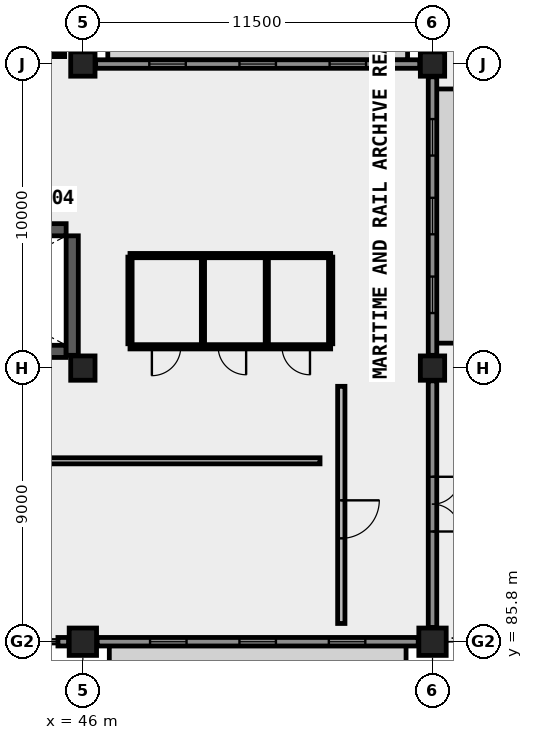
"""IFC4 building model, lengths in metres.
Left out: names, types, materials, properties, quantities, classifications, styles, units other than length and angle.
Written with IfcOpenShell. Run it as: python <this file> out.ifc"""

import sys

from ifc_helpers import new_model, si_unit, direction, frame, frame_2d, origin, origin_2d, place, context, subcontext, project, spatial, rectangle, extrude, element, fill, save


model = new_model("IFC4")
c1 = context("Model", 3, precision=1e-05, world=origin(), true_north=direction((0.0, 1.0)))
c2 = subcontext(c1, "Body", "Model", "MODEL_VIEW")
j1 = project(units=[si_unit("LENGTHUNIT", "METRE"), si_unit("PLANEANGLEUNIT", "RADIAN")], contexts=[c1])
p1 = place(None, origin())
s1 = spatial("IfcSite", under=j1, at=p1, CompositionType="ELEMENT")
p2 = place(p1, origin())
s2 = spatial("IfcBuilding", under=s1, at=p2, CompositionType="ELEMENT")
p3 = place(p2, frame((0.0, 0.0, 18.3)))
s3 = spatial("IfcBuildingStorey", under=s2, at=p3, CompositionType="ELEMENT", Elevation=18.3)
p4 = place(p3, frame((46.0, 85.8, 0.0), z_axis=(0.0, 0.0, 1.0), x_axis=(1.0, 0.0, 0.0)))
e1 = element("IfcColumn", 1, at=p4, inside=s3, PredefinedType="COLUMN", context=c2, shape_type="SweptSolid", body=[
    extrude(rectangle(XDim=0.9, YDim=0.9, at=origin_2d()), origin(), (0.0, 0.0, 1.0), 4.16),
])
for number, where, z_axis, x_axis in (
    (2, (46.0, 94.8, 0.0), (0.0, 0.0, 1.0), (1.0, 0.0, 0.0)),
    (3, (46.0, 104.8, 0.0), (0.0, 0.0, 1.0), (1.0, 0.0, 0.0)),
):
    element("IfcColumn", number, at=place(p3, frame(where, z_axis=z_axis, x_axis=x_axis)), inside=s3, PredefinedType="COLUMN", context=c2, shape_type="SweptSolid", body=[
        extrude(rectangle(XDim=0.8, YDim=0.8, at=origin_2d()), origin(), (0.0, 0.0, 1.0), 4.16),
    ])
p5 = place(p3, frame((57.5, 85.8, 0.0), z_axis=(0.0, 0.0, 1.0), x_axis=(1.0, 0.0, 0.0)))
e4 = element("IfcColumn", 4, at=p5, inside=s3, PredefinedType="COLUMN", context=c2, shape_type="SweptSolid", body=[
    extrude(rectangle(XDim=0.9, YDim=0.9, at=origin_2d()), origin(), (0.0, 0.0, 1.0), 4.16),
])
for number, where, z_axis, x_axis in (
    (5, (57.5, 94.8, 0.0), (0.0, 0.0, 1.0), (1.0, 0.0, 0.0)),
    (6, (57.5, 104.8, 0.0), (0.0, 0.0, 1.0), (1.0, 0.0, 0.0)),
):
    element("IfcColumn", number, at=place(p3, frame(where, z_axis=z_axis, x_axis=x_axis)), inside=s3, PredefinedType="COLUMN", context=c2, shape_type="SweptSolid", body=[
        extrude(rectangle(XDim=0.8, YDim=0.8, at=origin_2d()), origin(), (0.0, 0.0, 1.0), 4.16),
    ])
p6 = place(p3, frame((36.35, 95.35, 0.0), z_axis=(0.0, 0.0, 1.0), x_axis=(1.0, 0.0, 0.0)))
e7 = element("IfcWall", 7, at=p6, inside=s3, PredefinedType="SHEAR", context=c2, shape_type="SweptSolid", body=[
    extrude(rectangle(XDim=9.1, YDim=0.4, at=frame_2d((4.55, 0.0))), origin(), (0.0, 0.0, 1.0), 4.16),
])
p7 = place(p3, frame((36.35, 99.35, 0.0), z_axis=(0.0, 0.0, 1.0), x_axis=(1.0, 0.0, 0.0)))
e8 = element("IfcWall", 8, at=p7, inside=s3, PredefinedType="SHEAR", context=c2, shape_type="SweptSolid", body=[
    extrude(rectangle(XDim=9.1, YDim=0.4, at=frame_2d((4.55, 0.0))), origin(), (0.0, 0.0, 1.0), 4.16),
])
p8 = place(p7, frame((0.55, 0.0, 0.0)))
e9 = element("IfcOpeningElement", 9, at=p8, cuts=e8, PredefinedType="OPENING", context=c2, shape_type="SweptSolid", body=[
    extrude(rectangle(XDim=1.13, YDim=2.15, at=frame_2d((0.565, 1.075))), frame((0.0, 0.21, 0.0), z_axis=(0.0, -1.0, 0.0), x_axis=(1.0, 0.0, 0.0)), (0.0, 0.0, 1.0), 0.42),
])
p9 = place(p3, frame((45.65, 95.22, 0.0), z_axis=(0.0, 0.0, 1.0), x_axis=(0.0, 1.0, 0.0)))
e10 = element("IfcWall", 10, at=p9, inside=s3, PredefinedType="SHEAR", context=c2, shape_type="SweptSolid", body=[
    extrude(rectangle(XDim=3.93, YDim=0.4, at=frame_2d((1.965, 0.0))), origin(), (0.0, 0.0, 1.0), 4.16),
])
p10 = place(p3, frame((45.18, 85.8, 0.0), z_axis=(0.0, 0.0, 1.0), x_axis=(1.0, 0.0, 0.0)))
e11 = element("IfcWall", 11, at=p10, inside=s3, PredefinedType="SOLIDWALL", context=c2, shape_type="SweptSolid", body=[
    extrude(rectangle(XDim=0.35, YDim=0.28, at=frame_2d((0.175, 0.0))), origin(), (0.0, 0.0, 1.0), 3.89),
])
p11 = place(p3, frame((46.47, 85.8, 0.0), z_axis=(0.0, 0.0, 1.0), x_axis=(1.0, 0.0, 0.0)))
e12 = element("IfcWall", 12, at=p11, inside=s3, PredefinedType="SOLIDWALL", context=c2, shape_type="SweptSolid", body=[
    extrude(rectangle(XDim=10.56, YDim=0.28, at=frame_2d((5.28, 0.0))), origin(), (0.0, 0.0, 1.0), 3.1),
])
p12 = place(p11, frame((1.74, 0.0, 0.8)))
e13 = element("IfcOpeningElement", 13, at=p12, cuts=e12, PredefinedType="OPENING", context=c2, shape_type="SweptSolid", body=[
    extrude(rectangle(XDim=1.2, YDim=2.1, at=frame_2d((0.6, 1.05))), frame((0.0, 0.15, 0.0), z_axis=(0.0, -1.0, 0.0), x_axis=(1.0, 0.0, 0.0)), (0.0, 0.0, 1.0), 0.3),
])
p13 = place(p11, frame((4.68, 0.0, 0.8)))
e14 = element("IfcOpeningElement", 14, at=p13, cuts=e12, PredefinedType="OPENING", context=c2, shape_type="SweptSolid", body=[
    extrude(rectangle(XDim=1.2, YDim=2.1, at=frame_2d((0.6, 1.05))), frame((0.0, 0.15, 0.0), z_axis=(0.0, -1.0, 0.0), x_axis=(1.0, 0.0, 0.0)), (0.0, 0.0, 1.0), 0.3),
])
p14 = place(p11, frame((7.62, 0.0, 0.8)))
e15 = element("IfcOpeningElement", 15, at=p14, cuts=e12, PredefinedType="OPENING", context=c2, shape_type="SweptSolid", body=[
    extrude(rectangle(XDim=1.2, YDim=2.1, at=frame_2d((0.6, 1.05))), frame((0.0, 0.15, 0.0), z_axis=(0.0, -1.0, 0.0), x_axis=(1.0, 0.0, 0.0)), (0.0, 0.0, 1.0), 0.3),
])
p15 = place(p3, frame((57.5, 86.27, 0.0), z_axis=(0.0, 0.0, 1.0), x_axis=(0.0, 1.0, 0.0)))
e16 = element("IfcWall", 16, at=p15, inside=s3, PredefinedType="SOLIDWALL", context=c2, shape_type="SweptSolid", body=[
    extrude(rectangle(XDim=8.11, YDim=0.28, at=frame_2d((4.055, 0.0))), origin(), (0.0, 0.0, 1.0), 3.1),
])
p16 = place(p15, frame((3.155, 0.0, 0.0)))
e17 = element("IfcOpeningElement", 17, at=p16, cuts=e16, PredefinedType="OPENING", context=c2, shape_type="SweptSolid", body=[
    extrude(rectangle(XDim=1.8, YDim=2.25, at=frame_2d((0.9, 1.125))), frame((0.0, 0.15, 0.0), z_axis=(0.0, -1.0, 0.0), x_axis=(1.0, 0.0, 0.0)), (0.0, 0.0, 1.0), 0.3),
])
p17 = place(p3, frame((57.5, 95.22, 0.0), z_axis=(0.0, 0.0, 1.0), x_axis=(0.0, 1.0, 0.0)))
e18 = element("IfcWall", 18, at=p17, inside=s3, PredefinedType="SOLIDWALL", context=c2, shape_type="SweptSolid", body=[
    extrude(rectangle(XDim=9.16, YDim=0.28, at=frame_2d((4.58, 0.0))), origin(), (0.0, 0.0, 1.0), 3.1),
])
p18 = place(p17, frame((1.39, 0.0, 0.8)))
e19 = element("IfcOpeningElement", 19, at=p18, cuts=e18, PredefinedType="OPENING", context=c2, shape_type="SweptSolid", body=[
    extrude(rectangle(XDim=1.2, YDim=2.1, at=frame_2d((0.6, 1.05))), frame((0.0, 0.15, 0.0), z_axis=(0.0, -1.0, 0.0), x_axis=(1.0, 0.0, 0.0)), (0.0, 0.0, 1.0), 0.3),
])
p19 = place(p17, frame((3.98, 0.0, 0.8)))
e20 = element("IfcOpeningElement", 20, at=p19, cuts=e18, PredefinedType="OPENING", context=c2, shape_type="SweptSolid", body=[
    extrude(rectangle(XDim=1.2, YDim=2.1, at=frame_2d((0.6, 1.05))), frame((0.0, 0.15, 0.0), z_axis=(0.0, -1.0, 0.0), x_axis=(1.0, 0.0, 0.0)), (0.0, 0.0, 1.0), 0.3),
])
p20 = place(p17, frame((6.57, 0.0, 0.8)))
e21 = element("IfcOpeningElement", 21, at=p20, cuts=e18, PredefinedType="OPENING", context=c2, shape_type="SweptSolid", body=[
    extrude(rectangle(XDim=1.2, YDim=2.1, at=frame_2d((0.6, 1.05))), frame((0.0, 0.15, 0.0), z_axis=(0.0, -1.0, 0.0), x_axis=(1.0, 0.0, 0.0)), (0.0, 0.0, 1.0), 0.3),
])
p21 = place(p3, frame((46.42, 104.8, 0.0), z_axis=(0.0, 0.0, 1.0), x_axis=(1.0, 0.0, 0.0)))
e22 = element("IfcWall", 22, at=p21, inside=s3, PredefinedType="SOLIDWALL", context=c2, shape_type="SweptSolid", body=[
    extrude(rectangle(XDim=10.66, YDim=0.28, at=frame_2d((5.33, 0.0))), origin(), (0.0, 0.0, 1.0), 3.1),
])
p22 = place(p21, frame((1.765, 0.0, 0.8)))
e23 = element("IfcOpeningElement", 23, at=p22, cuts=e22, PredefinedType="OPENING", context=c2, shape_type="SweptSolid", body=[
    extrude(rectangle(XDim=1.2, YDim=2.1, at=frame_2d((0.6, 1.05))), frame((0.0, 0.15, 0.0), z_axis=(0.0, -1.0, 0.0), x_axis=(1.0, 0.0, 0.0)), (0.0, 0.0, 1.0), 0.3),
])
p23 = place(p21, frame((4.73, 0.0, 0.8)))
e24 = element("IfcOpeningElement", 24, at=p23, cuts=e22, PredefinedType="OPENING", context=c2, shape_type="SweptSolid", body=[
    extrude(rectangle(XDim=1.2, YDim=2.1, at=frame_2d((0.6, 1.05))), frame((0.0, 0.15, 0.0), z_axis=(0.0, -1.0, 0.0), x_axis=(1.0, 0.0, 0.0)), (0.0, 0.0, 1.0), 0.3),
])
p24 = place(p21, frame((7.695, 0.0, 0.8)))
e25 = element("IfcOpeningElement", 25, at=p24, cuts=e22, PredefinedType="OPENING", context=c2, shape_type="SweptSolid", body=[
    extrude(rectangle(XDim=1.2, YDim=2.1, at=frame_2d((0.6, 1.05))), frame((0.0, 0.15, 0.0), z_axis=(0.0, -1.0, 0.0), x_axis=(1.0, 0.0, 0.0)), (0.0, 0.0, 1.0), 0.3),
])
p25 = place(p3, frame((47.55, 95.5, 0.0), z_axis=(0.0, 0.0, 1.0), x_axis=(1.0, 0.0, 0.0)))
e26 = element("IfcWall", 26, at=p25, inside=s3, PredefinedType="PLUMBINGWALL", context=c2, shape_type="SweptSolid", body=[
    extrude(rectangle(XDim=6.6, YDim=0.14, at=frame_2d((3.3, 0.0))), origin(), (0.0, 0.0, 1.0), 3.88),
])
p26 = place(p25, frame((0.72, 0.0, 0.0)))
e27 = element("IfcOpeningElement", 27, at=p26, cuts=e26, PredefinedType="OPENING", context=c2, shape_type="SweptSolid", body=[
    extrude(rectangle(XDim=0.95, YDim=2.1, at=frame_2d((0.475, 1.05))), frame((0.0, 0.08, 0.0), z_axis=(0.0, -1.0, 0.0), x_axis=(1.0, 0.0, 0.0)), (0.0, 0.0, 1.0), 0.16),
])
p27 = place(p25, frame((2.9, 0.0, 0.0)))
e28 = element("IfcOpeningElement", 28, at=p27, cuts=e26, PredefinedType="OPENING", context=c2, shape_type="SweptSolid", body=[
    extrude(rectangle(XDim=0.92, YDim=2.1, at=frame_2d((0.46, 1.05))), frame((0.0, 0.08, 0.0), z_axis=(0.0, -1.0, 0.0), x_axis=(1.0, 0.0, 0.0)), (0.0, 0.0, 1.0), 0.16),
])
p28 = place(p25, frame((5.0, 0.0, 0.0)))
e29 = element("IfcOpeningElement", 29, at=p28, cuts=e26, PredefinedType="OPENING", context=c2, shape_type="SweptSolid", body=[
    extrude(rectangle(XDim=0.92, YDim=2.1, at=frame_2d((0.46, 1.05))), frame((0.0, 0.08, 0.0), z_axis=(0.0, -1.0, 0.0), x_axis=(1.0, 0.0, 0.0)), (0.0, 0.0, 1.0), 0.16),
])
p29 = place(p3, frame((47.55, 95.6, 0.0), z_axis=(0.0, 0.0, 1.0), x_axis=(0.0, 1.0, 0.0)))
e30 = element("IfcWall", 30, at=p29, inside=s3, PredefinedType="PLUMBINGWALL", context=c2, shape_type="SweptSolid", body=[
    extrude(rectangle(XDim=2.85, YDim=0.14, at=frame_2d((1.425, 0.0))), origin(), (0.0, 0.0, 1.0), 3.88),
])
p30 = place(p3, frame((49.95, 95.6, 0.0), z_axis=(0.0, 0.0, 1.0), x_axis=(0.0, 1.0, 0.0)))
e31 = element("IfcWall", 31, at=p30, inside=s3, PredefinedType="PARTITIONING", context=c2, shape_type="SweptSolid", body=[
    extrude(rectangle(XDim=2.85, YDim=0.105, at=frame_2d((1.425, 0.0))), origin(), (0.0, 0.0, 1.0), 3.35),
])
p31 = place(p3, frame((52.05, 95.6, 0.0), z_axis=(0.0, 0.0, 1.0), x_axis=(0.0, 1.0, 0.0)))
e32 = element("IfcWall", 32, at=p31, inside=s3, PredefinedType="PARTITIONING", context=c2, shape_type="SweptSolid", body=[
    extrude(rectangle(XDim=2.85, YDim=0.105, at=frame_2d((1.425, 0.0))), origin(), (0.0, 0.0, 1.0), 3.88),
])
p32 = place(p3, frame((54.15, 95.6, 0.0), z_axis=(0.0, 0.0, 1.0), x_axis=(0.0, 1.0, 0.0)))
e33 = element("IfcWall", 33, at=p32, inside=s3, PredefinedType="PLUMBINGWALL", context=c2, shape_type="SweptSolid", body=[
    extrude(rectangle(XDim=2.85, YDim=0.14, at=frame_2d((1.425, 0.0))), origin(), (0.0, 0.0, 1.0), 3.88),
])
p33 = place(p3, frame((47.55, 98.5, 0.0), z_axis=(0.0, 0.0, 1.0), x_axis=(1.0, 0.0, 0.0)))
e34 = element("IfcWall", 34, at=p33, inside=s3, PredefinedType="PLUMBINGWALL", context=c2, shape_type="SweptSolid", body=[
    extrude(rectangle(XDim=6.6, YDim=0.14, at=frame_2d((3.3, 0.0))), origin(), (0.0, 0.0, 1.0), 3.88),
])
p34 = place(p3, frame((24.4, 91.75, 0.0), z_axis=(0.0, 0.0, 1.0), x_axis=(1.0, 0.0, 0.0)))
e35 = element("IfcWall", 35, at=p34, inside=s3, PredefinedType="PARTITIONING", context=c2, shape_type="SweptSolid", body=[
    extrude(rectangle(XDim=29.4, YDim=0.2, at=frame_2d((14.7, 0.0))), origin(), (0.0, 0.0, 1.0), 3.88),
])
p35 = place(p34, frame((4.2, 0.0, 0.0)))
e36 = element("IfcOpeningElement", 36, at=p35, cuts=e35, PredefinedType="OPENING", context=c2, shape_type="SweptSolid", body=[
    extrude(rectangle(XDim=1.8, YDim=2.2, at=frame_2d((0.9, 1.1))), frame((0.0, 0.11, 0.0), z_axis=(0.0, -1.0, 0.0), x_axis=(1.0, 0.0, 0.0)), (0.0, 0.0, 1.0), 0.22),
])
p36 = place(p34, frame((16.5, 0.0, 0.0)))
e37 = element("IfcOpeningElement", 37, at=p36, cuts=e35, PredefinedType="OPENING", context=c2, shape_type="SweptSolid", body=[
    extrude(rectangle(XDim=0.98, YDim=2.15, at=frame_2d((0.49, 1.075))), frame((0.0, 0.11, 0.0), z_axis=(0.0, -1.0, 0.0), x_axis=(1.0, 0.0, 0.0)), (0.0, 0.0, 1.0), 0.22),
])
p37 = place(p3, frame((23.6, 105.1, 0.0), z_axis=(0.0, 0.0, 1.0), x_axis=(1.0, 0.0, 0.0)))
e38 = element("IfcWall", 38, at=p37, inside=s3, PredefinedType="MOVABLE", context=c2, shape_type="SweptSolid", body=[
    extrude(rectangle(XDim=21.8, YDim=0.11, at=frame_2d((10.9, 0.0))), origin(), (0.0, 0.0, 1.0), 3.88),
])
p38 = place(p37, frame((14.5, 0.0, 0.0)))
e39 = element("IfcOpeningElement", 39, at=p38, cuts=e38, PredefinedType="OPENING", context=c2, shape_type="SweptSolid", body=[
    extrude(rectangle(XDim=2.2, YDim=2.4, at=frame_2d((1.1, 1.2))), frame((0.0, 0.065, 0.0), z_axis=(0.0, -1.0, 0.0), x_axis=(1.0, 0.0, 0.0)), (0.0, 0.0, 1.0), 0.13),
])
p39 = place(p3, frame((54.5, 86.4, 0.0), z_axis=(0.0, 0.0, 1.0), x_axis=(0.0, 1.0, 0.0)))
e40 = element("IfcWall", 40, at=p39, inside=s3, PredefinedType="SOLIDWALL", context=c2, shape_type="SweptSolid", body=[
    extrude(rectangle(XDim=7.8, YDim=0.24, at=frame_2d((3.9, 0.0))), origin(), (0.0, 0.0, 1.0), 3.88),
])
p40 = place(p39, frame((2.8, 0.0, 0.0)))
e41 = element("IfcOpeningElement", 41, at=p40, cuts=e40, PredefinedType="OPENING", context=c2, shape_type="SweptSolid", body=[
    extrude(rectangle(XDim=1.25, YDim=2.15, at=frame_2d((0.625, 1.075))), frame((0.0, 0.13, 0.0), z_axis=(0.0, -1.0, 0.0), x_axis=(1.0, 0.0, 0.0)), (0.0, 0.0, 1.0), 0.26),
])
p41 = place(p12, origin())
e42 = element("IfcWindow", 42, at=p41, inside=s3, PartitioningType="SINGLE_PANEL", PredefinedType="WINDOW", context=c2, shape_type="SweptSolid", body=[
    extrude(rectangle(XDim=1.2, YDim=2.1, at=frame_2d((0.6, 1.05))), frame((0.0, 0.03, 0.0), z_axis=(0.0, -1.0, 0.0), x_axis=(1.0, 0.0, 0.0)), (0.0, 0.0, 1.0), 0.06),
])
fill(e13, e42)
p42 = place(p13, origin())
e43 = element("IfcWindow", 43, at=p42, inside=s3, PartitioningType="SINGLE_PANEL", PredefinedType="WINDOW", context=c2, shape_type="SweptSolid", body=[
    extrude(rectangle(XDim=1.2, YDim=2.1, at=frame_2d((0.6, 1.05))), frame((0.0, 0.03, 0.0), z_axis=(0.0, -1.0, 0.0), x_axis=(1.0, 0.0, 0.0)), (0.0, 0.0, 1.0), 0.06),
])
fill(e14, e43)
p43 = place(p14, origin())
e44 = element("IfcWindow", 44, at=p43, inside=s3, PartitioningType="SINGLE_PANEL", PredefinedType="WINDOW", context=c2, shape_type="SweptSolid", body=[
    extrude(rectangle(XDim=1.2, YDim=2.1, at=frame_2d((0.6, 1.05))), frame((0.0, 0.03, 0.0), z_axis=(0.0, -1.0, 0.0), x_axis=(1.0, 0.0, 0.0)), (0.0, 0.0, 1.0), 0.06),
])
fill(e15, e44)
p44 = place(p16, frame((0.9, 0.0, 0.0), z_axis=(0.0, 0.0, 1.0), x_axis=(-1.0, 0.0, 0.0)))
e45 = element("IfcDoor", 45, at=p44, inside=s3, OperationType="DOUBLE_DOOR_SINGLE_SWING", PredefinedType="DOOR", context=c2, shape_type="SweptSolid", body=[
    extrude(rectangle(XDim=1.8, YDim=2.25, at=frame_2d((0.0, 1.125))), frame((0.0, 0.025, 0.0), z_axis=(0.0, -1.0, 0.0), x_axis=(1.0, 0.0, 0.0)), (0.0, 0.0, 1.0), 0.05),
])
fill(e17, e45)
p45 = place(p18, origin())
e46 = element("IfcWindow", 46, at=p45, inside=s3, PartitioningType="SINGLE_PANEL", PredefinedType="WINDOW", context=c2, shape_type="SweptSolid", body=[
    extrude(rectangle(XDim=1.2, YDim=2.1, at=frame_2d((0.6, 1.05))), frame((0.0, 0.03, 0.0), z_axis=(0.0, -1.0, 0.0), x_axis=(1.0, 0.0, 0.0)), (0.0, 0.0, 1.0), 0.06),
])
fill(e19, e46)
p46 = place(p19, origin())
e47 = element("IfcWindow", 47, at=p46, inside=s3, PartitioningType="SINGLE_PANEL", PredefinedType="WINDOW", context=c2, shape_type="SweptSolid", body=[
    extrude(rectangle(XDim=1.2, YDim=2.1, at=frame_2d((0.6, 1.05))), frame((0.0, 0.03, 0.0), z_axis=(0.0, -1.0, 0.0), x_axis=(1.0, 0.0, 0.0)), (0.0, 0.0, 1.0), 0.06),
])
fill(e20, e47)
p47 = place(p20, origin())
e48 = element("IfcWindow", 48, at=p47, inside=s3, PartitioningType="SINGLE_PANEL", PredefinedType="WINDOW", context=c2, shape_type="SweptSolid", body=[
    extrude(rectangle(XDim=1.2, YDim=2.1, at=frame_2d((0.6, 1.05))), frame((0.0, 0.03, 0.0), z_axis=(0.0, -1.0, 0.0), x_axis=(1.0, 0.0, 0.0)), (0.0, 0.0, 1.0), 0.06),
])
fill(e21, e48)
p48 = place(p22, origin())
e49 = element("IfcWindow", 49, at=p48, inside=s3, PartitioningType="SINGLE_PANEL", PredefinedType="WINDOW", context=c2, shape_type="SweptSolid", body=[
    extrude(rectangle(XDim=1.2, YDim=2.1, at=frame_2d((0.6, 1.05))), frame((0.0, 0.03, 0.0), z_axis=(0.0, -1.0, 0.0), x_axis=(1.0, 0.0, 0.0)), (0.0, 0.0, 1.0), 0.06),
])
fill(e23, e49)
p49 = place(p23, origin())
e50 = element("IfcWindow", 50, at=p49, inside=s3, PartitioningType="SINGLE_PANEL", PredefinedType="WINDOW", context=c2, shape_type="SweptSolid", body=[
    extrude(rectangle(XDim=1.2, YDim=2.1, at=frame_2d((0.6, 1.05))), frame((0.0, 0.03, 0.0), z_axis=(0.0, -1.0, 0.0), x_axis=(1.0, 0.0, 0.0)), (0.0, 0.0, 1.0), 0.06),
])
fill(e24, e50)
p50 = place(p24, origin())
e51 = element("IfcWindow", 51, at=p50, inside=s3, PartitioningType="SINGLE_PANEL", PredefinedType="WINDOW", context=c2, shape_type="SweptSolid", body=[
    extrude(rectangle(XDim=1.2, YDim=2.1, at=frame_2d((0.6, 1.05))), frame((0.0, 0.03, 0.0), z_axis=(0.0, -1.0, 0.0), x_axis=(1.0, 0.0, 0.0)), (0.0, 0.0, 1.0), 0.06),
])
fill(e25, e51)
p51 = place(p26, frame((0.475, 0.0, 0.0), z_axis=(0.0, 0.0, 1.0), x_axis=(-1.0, 0.0, 0.0)))
e52 = element("IfcDoor", 52, at=p51, inside=s3, OperationType="SINGLE_SWING_LEFT", PredefinedType="DOOR", context=c2, shape_type="SweptSolid", body=[
    extrude(rectangle(XDim=0.95, YDim=2.1, at=frame_2d((0.0, 1.05))), frame((0.0, 0.025, 0.0), z_axis=(0.0, -1.0, 0.0), x_axis=(1.0, 0.0, 0.0)), (0.0, 0.0, 1.0), 0.05),
])
fill(e27, e52)
p52 = place(p27, origin())
e53 = element("IfcDoor", 53, at=p52, inside=s3, OperationType="SINGLE_SWING_RIGHT", PredefinedType="DOOR", context=c2, shape_type="SweptSolid", body=[
    extrude(rectangle(XDim=0.92, YDim=2.1, at=frame_2d((0.46, 1.05))), frame((0.0, 0.025, 0.0), z_axis=(0.0, -1.0, 0.0), x_axis=(1.0, 0.0, 0.0)), (0.0, 0.0, 1.0), 0.05),
])
fill(e28, e53)
p53 = place(p28, origin())
e54 = element("IfcDoor", 54, at=p53, inside=s3, OperationType="SINGLE_SWING_RIGHT", PredefinedType="DOOR", context=c2, shape_type="SweptSolid", body=[
    extrude(rectangle(XDim=0.92, YDim=2.1, at=frame_2d((0.46, 1.05))), frame((0.0, 0.025, 0.0), z_axis=(0.0, -1.0, 0.0), x_axis=(1.0, 0.0, 0.0)), (0.0, 0.0, 1.0), 0.05),
])
fill(e29, e54)
p54 = place(p40, origin())
e55 = element("IfcDoor", 55, at=p54, inside=s3, OperationType="SINGLE_SWING_RIGHT", PredefinedType="DOOR", context=c2, shape_type="SweptSolid", body=[
    extrude(rectangle(XDim=1.25, YDim=2.15, at=frame_2d((0.625, 1.075))), frame((0.0, 0.025, 0.0), z_axis=(0.0, -1.0, 0.0), x_axis=(1.0, 0.0, 0.0)), (0.0, 0.0, 1.0), 0.05),
])
fill(e41, e55)
save(model, sys.argv[1])
